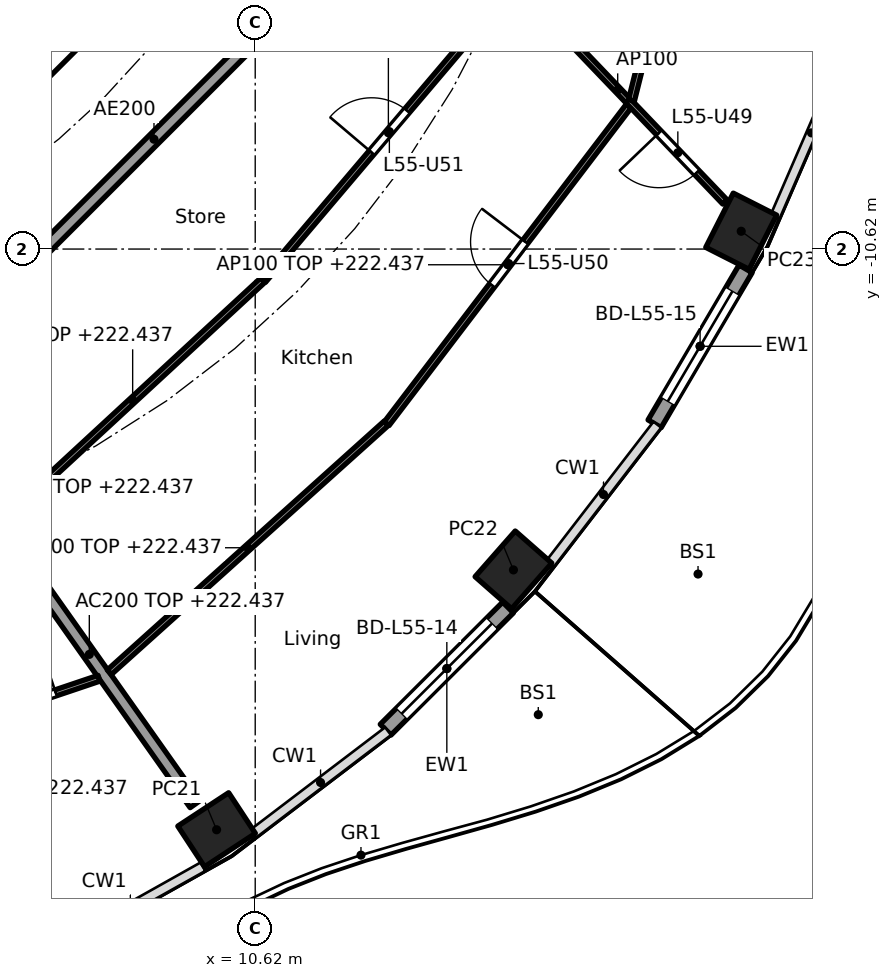
"""IFC4 building model, lengths in metres.
Left out: names, types, materials, properties, quantities, classifications, styles, units other than length and angle.
Written with IfcOpenShell. Run it as: python <this file> out.ifc"""

import sys

from ifc_helpers import new_model, si_unit, direction, frame, frame_2d, origin, origin_2d, place, context, subcontext, project, spatial, rectangle, hollow_rectangle, extrude, element, fill, save


model = new_model("IFC4")
c1 = context("Model", 3, precision=1e-05, world=origin(), true_north=direction((0.0, 1.0)))
c2 = subcontext(c1, "Body", "Model", "MODEL_VIEW")
j1 = project(units=[si_unit("LENGTHUNIT", "METRE"), si_unit("PLANEANGLEUNIT", "RADIAN")], contexts=[c1])
p1 = place(None, origin())
s1 = spatial("IfcSite", under=j1, at=p1, CompositionType="ELEMENT")
p2 = place(p1, origin())
s2 = spatial("IfcBuilding", under=s1, at=p2, CompositionType="ELEMENT")
p3 = place(p2, frame((0.0, 0.0, 219.6)))
s3 = spatial("IfcBuildingStorey", under=s2, at=p3, CompositionType="ELEMENT", Elevation=219.6)
for number, where, z_axis, x_axis in (
    (1, (9.985, -20.17, 0.0), (0.0, 0.0, 1.0), (0.836, 0.549, 0.0)),
    (2, (14.866, -15.896, 0.0), (0.0, 0.0, 1.0), (0.66, 0.751, 0.0)),
    (3, (18.612, -10.327, 0.0), (0.0, 0.0, 1.0), (0.452, 0.892, 0.0)),
):
    element("IfcColumn", number, at=place(p3, frame(where, z_axis=z_axis, x_axis=x_axis)), inside=s3, PredefinedType="COLUMN", context=c2, shape_type="SweptSolid", body=[
        extrude(hollow_rectangle(XDim=1.0, YDim=0.8, WallThickness=0.032, at=origin_2d()), origin(), (0.0, 0.0, 1.0), 3.7),
    ])
p4 = place(p3, frame((14.778, -16.515, 0.0), z_axis=(0.0, 0.0, 1.0), x_axis=(-0.707836044127, -0.706376765356, 0.0)))
e4 = element("IfcWall", 4, at=p4, inside=s3, PredefinedType="SOLIDWALL", context=c2, shape_type="SweptSolid", body=[
    extrude(rectangle(XDim=2.844, YDim=0.25, at=frame_2d((1.422, 0.0))), origin(), (0.0, 0.0, 1.0), 3.44),
])
p5 = place(p4, frame((0.372, 0.0, 0.0)))
e5 = element("IfcOpeningElement", 5, at=p5, cuts=e4, PredefinedType="OPENING", context=c2, shape_type="SweptSolid", body=[
    extrude(rectangle(XDim=2.1, YDim=2.4, at=frame_2d((1.05, 1.2))), frame((0.0, 0.135, 0.0), z_axis=(0.0, -1.0, 0.0), x_axis=(1.0, 0.0, 0.0)), (0.0, 0.0, 1.0), 0.27),
])
p6 = place(p3, frame((18.684, -10.945, 0.0), z_axis=(0.0, 0.0, 1.0), x_axis=(-0.5063555387, -0.862324804484, 0.0)))
e6 = element("IfcWall", 6, at=p6, inside=s3, PredefinedType="SOLIDWALL", context=c2, shape_type="SweptSolid", body=[
    extrude(rectangle(XDim=2.955, YDim=0.25, at=frame_2d((1.477, 0.0))), origin(), (0.0, 0.0, 1.0), 3.44),
])
p7 = place(p6, frame((0.427, 0.0, 0.0)))
e7 = element("IfcOpeningElement", 7, at=p7, cuts=e6, PredefinedType="OPENING", context=c2, shape_type="SweptSolid", body=[
    extrude(rectangle(XDim=2.1, YDim=2.4, at=frame_2d((1.05, 1.2))), frame((0.0, 0.135, 0.0), z_axis=(0.0, -1.0, 0.0), x_axis=(1.0, 0.0, 0.0)), (0.0, 0.0, 1.0), 0.27),
])
p8 = place(p3, frame((4.613, -9.988, 0.0), z_axis=(0.0, 0.0, 1.0), x_axis=(0.707106781187, 0.707106781187, 0.0)))
e8 = element("IfcWall", 8, at=p8, inside=s3, PredefinedType="SHEAR", context=c2, shape_type="SweptSolid", body=[
    extrude(rectangle(XDim=7.602, YDim=0.6, at=frame_2d((3.801, 0.0))), origin(), (0.0, 0.0, 1.0), 3.44),
])
p9 = place(p8, frame((3.201, 0.0, 0.0)))
e9 = element("IfcOpeningElement", 9, at=p9, cuts=e8, PredefinedType="OPENING", context=c2, shape_type="SweptSolid", body=[
    extrude(rectangle(XDim=1.2, YDim=2.1, at=frame_2d((0.6, 1.05))), frame((0.0, 0.31, 0.0), z_axis=(0.0, -1.0, 0.0), x_axis=(1.0, 0.0, 0.0)), (0.0, 0.0, 1.0), 0.62),
])
p10 = place(p3, frame((6.152, -14.823, 0.0), z_axis=(0.0, 0.0, 1.0), x_axis=(0.576994695158, -0.816747893637, 0.0)))
e10 = element("IfcWall", 10, at=p10, inside=s3, PredefinedType="PARTITIONING", context=c2, shape_type="SweptSolid", body=[
    extrude(rectangle(XDim=6.03, YDim=0.2, at=frame_2d((3.015, 0.0))), origin(), (0.0, 0.0, 1.0), 2.837),
])
p11 = place(p3, frame((5.275, -12.494, 0.0), z_axis=(0.0, 0.0, 1.0), x_axis=(0.707106781187, 0.707106781187, 0.0)))
e11 = element("IfcWall", 11, at=p11, inside=s3, PredefinedType="PARTITIONING", context=c2, shape_type="SweptSolid", body=[
    extrude(rectangle(XDim=10.409, YDim=0.2, at=frame_2d((5.205, 0.0))), origin(), (0.0, 0.0, 1.0), 3.44),
])
p12 = place(p3, frame((3.453, -19.229, 0.0), z_axis=(0.0, 0.0, 1.0), x_axis=(0.947565610716, 0.31956128268, 0.0)))
e12 = element("IfcWall", 12, at=p12, inside=s3, PredefinedType="PARTITIONING", context=c2, shape_type="SweptSolid", body=[
    extrude(rectangle(XDim=4.853, YDim=0.1, at=frame_2d((2.426, 0.0))), origin(), (0.0, 0.0, 1.0), 2.837),
])
p13 = place(p12, frame((3.202, 0.0, 0.0)))
e13 = element("IfcOpeningElement", 13, at=p13, cuts=e12, PredefinedType="OPENING", context=c2, shape_type="SweptSolid", body=[
    extrude(rectangle(XDim=0.9, YDim=2.1, at=frame_2d((0.45, 1.05))), frame((0.0, 0.06, 0.0), z_axis=(0.0, -1.0, 0.0), x_axis=(1.0, 0.0, 0.0)), (0.0, 0.0, 1.0), 0.12),
])
p14 = place(p3, frame((6.461, -15.088, 0.0), z_axis=(0.0, 0.0, 1.0), x_axis=(0.73461579427, 0.678483334217, 0.0)))
e14 = element("IfcWall", 14, at=p14, inside=s3, PredefinedType="PARTITIONING", context=c2, shape_type="SweptSolid", body=[
    extrude(rectangle(XDim=5.837, YDim=0.1, at=frame_2d((2.918, 0.0))), origin(), (0.0, 0.0, 1.0), 2.837),
])
p15 = place(p3, frame((8.22, -17.579, 0.0), z_axis=(0.0, 0.0, 1.0), x_axis=(0.743696370895, 0.668517544958, 0.0)))
e15 = element("IfcWall", 15, at=p15, inside=s3, PredefinedType="PARTITIONING", context=c2, shape_type="SweptSolid", body=[
    extrude(rectangle(XDim=6.125, YDim=0.1, at=frame_2d((3.062, 0.0))), origin(), (0.0, 0.0, 1.0), 2.837),
])
p16 = place(p3, frame((10.753, -11.132, 0.0), z_axis=(0.0, 0.0, 1.0), x_axis=(0.647001799757, 0.762488472773, 0.0)))
e16 = element("IfcWall", 16, at=p16, inside=s3, PredefinedType="PARTITIONING", context=c2, shape_type="SweptSolid", body=[
    extrude(rectangle(XDim=6.359, YDim=0.1, at=frame_2d((3.179, 0.0))), origin(), (0.0, 0.0, 1.0), 2.837),
])
p17 = place(p16, frame((2.754, 0.0, 0.0)))
e17 = element("IfcOpeningElement", 17, at=p17, cuts=e16, PredefinedType="OPENING", context=c2, shape_type="SweptSolid", body=[
    extrude(rectangle(XDim=0.9, YDim=2.1, at=frame_2d((0.45, 1.05))), frame((0.0, 0.06, 0.0), z_axis=(0.0, -1.0, 0.0), x_axis=(1.0, 0.0, 0.0)), (0.0, 0.0, 1.0), 0.12),
])
p18 = place(p3, frame((12.782, -13.491, 0.0), z_axis=(0.0, 0.0, 1.0), x_axis=(0.606136140755, 0.795360911078, 0.0)))
e18 = element("IfcWall", 18, at=p18, inside=s3, PredefinedType="PARTITIONING", context=c2, shape_type="SweptSolid", body=[
    extrude(rectangle(XDim=6.57, YDim=0.1, at=frame_2d((3.285, 0.0))), origin(), (0.0, 0.0, 1.0), 2.837),
])
p19 = place(p18, frame((2.86, 0.0, 0.0)))
e19 = element("IfcOpeningElement", 19, at=p19, cuts=e18, PredefinedType="OPENING", context=c2, shape_type="SweptSolid", body=[
    extrude(rectangle(XDim=0.9, YDim=2.1, at=frame_2d((0.45, 1.05))), frame((0.0, 0.06, 0.0), z_axis=(0.0, -1.0, 0.0), x_axis=(1.0, 0.0, 0.0)), (0.0, 0.0, 1.0), 0.12),
])
p20 = place(p3, frame((14.817, -6.159, 0.0), z_axis=(0.0, 0.0, 1.0), x_axis=(0.691437669875, -0.722436120828, 0.0)))
e20 = element("IfcWall", 20, at=p20, inside=s3, PredefinedType="PARTITIONING", context=c2, shape_type="SweptSolid", body=[
    extrude(rectangle(XDim=5.104, YDim=0.1, at=frame_2d((2.552, 0.0))), origin(), (0.0, 0.0, 1.0), 3.44),
])
p21 = place(p20, frame((3.532, 0.0, 0.0)))
e21 = element("IfcOpeningElement", 21, at=p21, cuts=e20, PredefinedType="OPENING", context=c2, shape_type="SweptSolid", body=[
    extrude(rectangle(XDim=0.9, YDim=2.1, at=frame_2d((0.45, 1.05))), frame((0.0, 0.06, 0.0), z_axis=(0.0, -1.0, 0.0), x_axis=(1.0, 0.0, 0.0)), (0.0, 0.0, 1.0), 0.12),
])
p22 = place(p3, frame((16.807, -8.177, 0.0), z_axis=(0.0, 0.0, 1.0), x_axis=(0.243002985225, 0.970025540474, 0.0)))
e22 = element("IfcWall", 22, at=p22, inside=s3, PredefinedType="PARTITIONING", context=c2, shape_type="SweptSolid", body=[
    extrude(rectangle(XDim=5.162, YDim=0.1, at=frame_2d((2.581, 0.0))), origin(), (0.0, 0.0, 1.0), 2.837),
])
p23 = place(p22, frame((2.844, 0.0, 0.0)))
e23 = element("IfcOpeningElement", 23, at=p23, cuts=e22, PredefinedType="OPENING", context=c2, shape_type="SweptSolid", body=[
    extrude(rectangle(XDim=0.9, YDim=2.1, at=frame_2d((0.45, 1.05))), frame((0.0, 0.06, 0.0), z_axis=(0.0, -1.0, 0.0), x_axis=(1.0, 0.0, 0.0)), (0.0, 0.0, 1.0), 0.12),
])
p24 = place(p5, origin())
e24 = element("IfcDoor", 24, at=p24, inside=s3, OperationType="SLIDING_TO_LEFT", PredefinedType="DOOR", context=c2, shape_type="SweptSolid", body=[
    extrude(rectangle(XDim=2.1, YDim=2.4, at=frame_2d((1.05, 1.2))), frame((0.0, 0.025, 0.0), z_axis=(0.0, -1.0, 0.0), x_axis=(1.0, 0.0, 0.0)), (0.0, 0.0, 1.0), 0.05),
])
fill(e5, e24)
p25 = place(p7, origin())
e25 = element("IfcDoor", 25, at=p25, inside=s3, OperationType="SLIDING_TO_LEFT", PredefinedType="DOOR", context=c2, shape_type="SweptSolid", body=[
    extrude(rectangle(XDim=2.1, YDim=2.4, at=frame_2d((1.05, 1.2))), frame((0.0, 0.025, 0.0), z_axis=(0.0, -1.0, 0.0), x_axis=(1.0, 0.0, 0.0)), (0.0, 0.0, 1.0), 0.05),
])
fill(e7, e25)
p26 = place(p9, origin())
e26 = element("IfcDoor", 26, at=p26, inside=s3, OperationType="SINGLE_SWING_RIGHT", PredefinedType="DOOR", context=c2, shape_type="SweptSolid", body=[
    extrude(rectangle(XDim=1.2, YDim=2.1, at=frame_2d((0.6, 1.05))), frame((0.0, 0.025, 0.0), z_axis=(0.0, -1.0, 0.0), x_axis=(1.0, 0.0, 0.0)), (0.0, 0.0, 1.0), 0.05),
])
fill(e9, e26)
p27 = place(p13, origin())
e27 = element("IfcDoor", 27, at=p27, inside=s3, OperationType="SINGLE_SWING_RIGHT", PredefinedType="DOOR", context=c2, shape_type="SweptSolid", body=[
    extrude(rectangle(XDim=0.9, YDim=2.1, at=frame_2d((0.45, 1.05))), frame((0.0, 0.025, 0.0), z_axis=(0.0, -1.0, 0.0), x_axis=(1.0, 0.0, 0.0)), (0.0, 0.0, 1.0), 0.05),
])
fill(e13, e27)
p28 = place(p21, frame((0.9, 0.0, 0.0), x_axis=(-1.0, 0.0, 0.0)))
e28 = element("IfcDoor", 28, at=p28, inside=s3, OperationType="SINGLE_SWING_RIGHT", PredefinedType="DOOR", context=c2, shape_type="SweptSolid", body=[
    extrude(rectangle(XDim=0.9, YDim=2.1, at=frame_2d((0.45, 1.05))), frame((0.0, 0.025, 0.0), z_axis=(0.0, -1.0, 0.0), x_axis=(1.0, 0.0, 0.0)), (0.0, 0.0, 1.0), 0.05),
])
fill(e21, e28)
p29 = place(p19, origin())
e29 = element("IfcDoor", 29, at=p29, inside=s3, OperationType="SINGLE_SWING_RIGHT", PredefinedType="DOOR", context=c2, shape_type="SweptSolid", body=[
    extrude(rectangle(XDim=0.9, YDim=2.1, at=frame_2d((0.45, 1.05))), frame((0.0, 0.025, 0.0), z_axis=(0.0, -1.0, 0.0), x_axis=(1.0, 0.0, 0.0)), (0.0, 0.0, 1.0), 0.05),
])
fill(e19, e29)
p30 = place(p17, origin())
e30 = element("IfcDoor", 30, at=p30, inside=s3, OperationType="SINGLE_SWING_LEFT", PredefinedType="DOOR", context=c2, shape_type="SweptSolid", body=[
    extrude(rectangle(XDim=0.9, YDim=2.1, at=frame_2d((0.45, 1.05))), frame((0.0, 0.025, 0.0), z_axis=(0.0, -1.0, 0.0), x_axis=(1.0, 0.0, 0.0)), (0.0, 0.0, 1.0), 0.05),
])
fill(e17, e30)
save(model, sys.argv[1])
